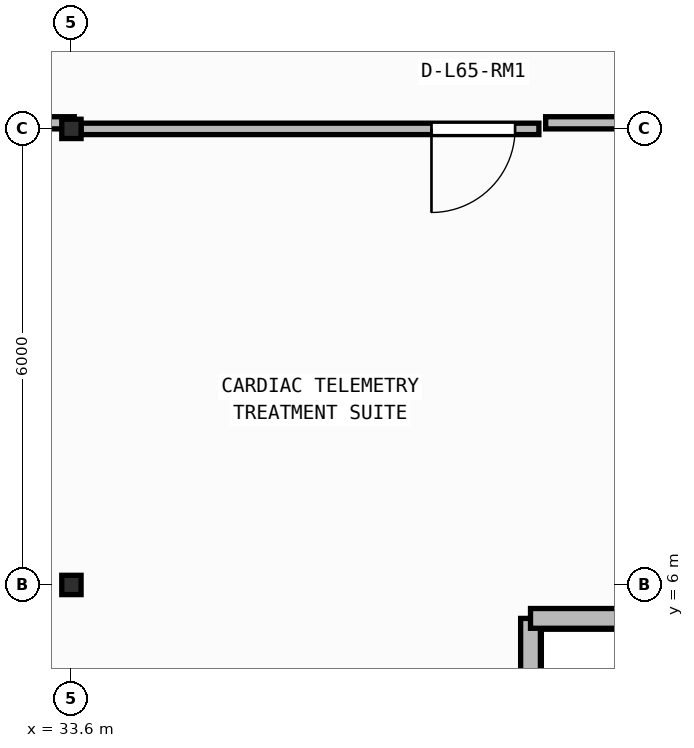
"""IFC4 building model, lengths in metres.
Left out: names, types, materials, properties, quantities, classifications, styles, units other than length and angle.
Written with IfcOpenShell. Run it as: python <this file> out.ifc"""

import sys

from ifc_helpers import new_model, si_unit, direction, frame, frame_2d, origin, origin_2d, place, context, subcontext, project, spatial, rectangle, i_section, extrude, element, fill, save


model = new_model("IFC4")
c1 = context("Model", 3, precision=1e-05, world=origin(), true_north=direction((0.0, 1.0)))
c2 = subcontext(c1, "Body", "Model", "MODEL_VIEW")
j1 = project(units=[si_unit("LENGTHUNIT", "METRE"), si_unit("PLANEANGLEUNIT", "RADIAN")], contexts=[c1])
p1 = place(None, origin())
s1 = spatial("IfcSite", under=j1, at=p1, CompositionType="ELEMENT")
p2 = place(p1, origin())
s2 = spatial("IfcBuilding", under=s1, at=p2, CompositionType="ELEMENT")
p3 = place(p2, frame((0.0, 0.0, 264.45)))
s3 = spatial("IfcBuildingStorey", under=s2, at=p3, CompositionType="ELEMENT", Elevation=264.45)
for number, where, z_axis, x_axis in (
    (1, (33.6, 6.0, 0.0), (0.0, 0.0, 1.0), (1.0, 0.0, 0.0)),
    (2, (33.6, 12.0, 0.0), (0.0, 0.0, 1.0), (1.0, 0.0, 0.0)),
):
    element("IfcColumn", number, at=place(p3, frame(where, z_axis=z_axis, x_axis=x_axis)), inside=s3, PredefinedType="COLUMN", context=c2, shape_type="SweptSolid", body=[
        extrude(i_section(OverallWidth=0.254, OverallDepth=0.254, WebThickness=0.009, FlangeThickness=0.014, FilletRadius=0.013, at=origin_2d()), origin(), (0.0, 0.0, 1.0), 3.95),
    ])
p4 = place(p3, frame((39.64, 3.148, 0.0), z_axis=(0.0, 0.0, 1.0), x_axis=(0.0, 1.0, 0.0)))
e3 = element("IfcWall", 3, at=p4, inside=s3, PredefinedType="STANDARD", context=c2, shape_type="SweptSolid", body=[
    extrude(rectangle(XDim=2.412, YDim=0.26, at=frame_2d((1.206, 0.0))), origin(), (0.0, 0.0, 1.0), 3.71),
])
p5 = place(p3, frame((39.64, 5.56, 0.0), z_axis=(0.0, 0.0, 1.0), x_axis=(1.0, 0.0, 0.0)))
e4 = element("IfcWall", 4, at=p5, inside=s3, PredefinedType="STANDARD", context=c2, shape_type="SweptSolid", body=[
    extrude(rectangle(XDim=2.4, YDim=0.26, at=frame_2d((1.2, 0.0))), origin(), (0.0, 0.0, 1.0), 3.71),
])
p6 = place(p3, frame((39.75, 12.0, 0.0), z_axis=(0.0, 0.0, 1.0), x_axis=(-1.0, 0.0, 0.0)))
e5 = element("IfcWall", 5, at=p6, inside=s3, PredefinedType="PARTITIONING", context=c2, shape_type="SweptSolid", body=[
    extrude(rectangle(XDim=6.023, YDim=0.15, at=frame_2d((3.011, 0.0))), origin(), (0.0, 0.0, 1.0), 3.71),
])
p7 = place(p6, frame((0.313, 0.0, 0.0)))
e6 = element("IfcOpeningElement", 6, at=p7, cuts=e5, PredefinedType="OPENING", context=c2, shape_type="SweptSolid", body=[
    extrude(rectangle(XDim=1.1, YDim=2.1, at=frame_2d((0.55, 1.05))), frame((0.0, 0.085, 0.0), z_axis=(0.0, -1.0, 0.0), x_axis=(1.0, 0.0, 0.0)), (0.0, 0.0, 1.0), 0.17),
])
p8 = place(p3, frame((31.439, 12.08, 0.0), z_axis=(0.0, 0.0, 1.0), x_axis=(1.0, 0.0, 0.0)))
e7 = element("IfcWall", 7, at=p8, inside=s3, PredefinedType="PARTITIONING", context=c2, shape_type="SweptSolid", body=[
    extrude(rectangle(XDim=2.198, YDim=0.16, at=frame_2d((1.099, 0.0))), origin(), (0.0, 0.0, 1.0), 3.157),
])
p9 = place(p3, frame((39.839, 12.08, 0.0), z_axis=(0.0, 0.0, 1.0), x_axis=(1.0, 0.0, 0.0)))
e8 = element("IfcWall", 8, at=p9, inside=s3, PredefinedType="PARTITIONING", context=c2, shape_type="SweptSolid", body=[
    extrude(rectangle(XDim=2.061, YDim=0.16, at=frame_2d((1.03, 0.0))), origin(), (0.0, 0.0, 1.0), 3.71),
])
p10 = place(p7, origin())
e9 = element("IfcDoor", 9, at=p10, inside=s3, OperationType="SINGLE_SWING_RIGHT", PredefinedType="DOOR", context=c2, shape_type="SweptSolid", body=[
    extrude(rectangle(XDim=1.1, YDim=2.1, at=frame_2d((0.55, 1.05))), frame((0.0, 0.025, 0.0), z_axis=(0.0, -1.0, 0.0), x_axis=(1.0, 0.0, 0.0)), (0.0, 0.0, 1.0), 0.05),
])
fill(e6, e9)
save(model, sys.argv[1])
